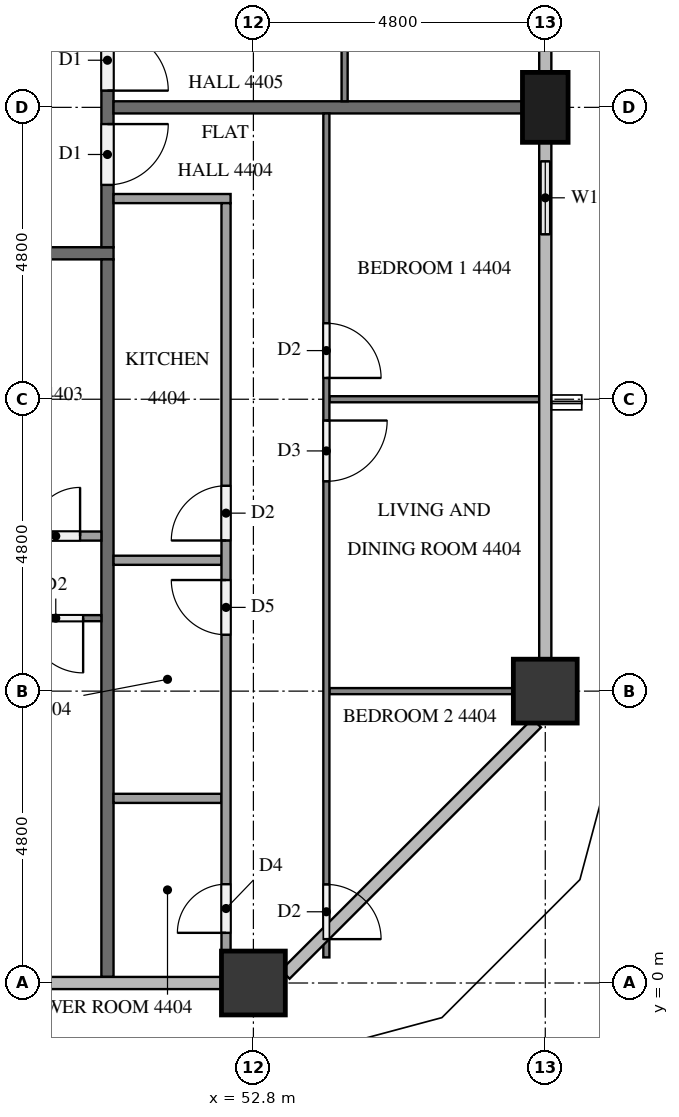
"""IFC4 building model, lengths in metres.
Left out: names, types, materials, properties, quantities, classifications, styles, units other than length and angle.
Written with IfcOpenShell. Run it as: python <this file> out.ifc"""

import sys

from ifc_helpers import new_model, si_unit, direction, frame, frame_2d, origin, origin_2d, place, context, subcontext, project, spatial, rectangle, extrude, element, fill, save


model = new_model("IFC4")
c1 = context("Model", 3, precision=1e-05, world=origin(), true_north=direction((0.0, 1.0)))
c2 = subcontext(c1, "Body", "Model", "MODEL_VIEW")
j1 = project(units=[si_unit("LENGTHUNIT", "METRE"), si_unit("PLANEANGLEUNIT", "RADIAN")], contexts=[c1])
p1 = place(None, origin())
s1 = spatial("IfcSite", under=j1, at=p1, CompositionType="ELEMENT")
p2 = place(p1, origin())
s2 = spatial("IfcBuilding", under=s1, at=p2, CompositionType="ELEMENT")
p3 = place(p2, frame((0.0, 0.0, 170.0)))
s3 = spatial("IfcBuildingStorey", under=s2, at=p3, CompositionType="ELEMENT", Elevation=170.0)
for number, where, z_axis, x_axis in (
    (1, (52.8, 0.0, 0.0), (0.0, 0.0, 1.0), (1.0, 0.0, 0.0)),
    (2, (57.6, 4.8, 0.0), (0.0, 0.0, 1.0), (1.0, 0.0, 0.0)),
):
    element("IfcColumn", number, at=place(p3, frame(where, z_axis=z_axis, x_axis=x_axis)), inside=s3, PredefinedType="COLUMN", context=c2, shape_type="SweptSolid", body=[
        extrude(rectangle(XDim=1.05, YDim=1.05, at=origin_2d()), origin(), (0.0, 0.0, 1.0), 3.1),
    ])
p4 = place(p3, frame((57.6, 14.4, 0.0), z_axis=(0.0, 0.0, 1.0), x_axis=(0.0, 1.0, 0.0)))
e3 = element("IfcColumn", 3, at=p4, inside=s3, PredefinedType="COLUMN", context=c2, shape_type="SweptSolid", body=[
    extrude(rectangle(XDim=1.15, YDim=0.75, at=origin_2d()), origin(), (0.0, 0.0, 1.0), 3.1),
])
p5 = place(p3, frame((57.6, 12.0, 0.0), z_axis=(0.0, 0.0, 1.0), x_axis=(0.0, 1.0, 0.0)))
e4 = element("IfcWall", 4, at=p5, inside=s3, PredefinedType="SOLIDWALL", context=c2, shape_type="SweptSolid", body=[
    extrude(rectangle(XDim=1.825, YDim=0.15, at=frame_2d((0.913, 0.0))), origin(), (0.0, 0.0, 1.0), 3.1),
])
p6 = place(p5, frame((0.312, 0.0, 0.9)))
e5 = element("IfcOpeningElement", 5, at=p6, cuts=e4, PredefinedType="OPENING", context=c2, shape_type="SweptSolid", body=[
    extrude(rectangle(XDim=1.2, YDim=1.4, at=frame_2d((0.6, 0.7))), frame((0.0, 0.085, 0.0), z_axis=(0.0, -1.0, 0.0), x_axis=(1.0, 0.0, 0.0)), (0.0, 0.0, 1.0), 0.17),
])
p7 = place(p3, frame((50.5, 12.0, 0.0), z_axis=(0.0, 0.0, 1.0), x_axis=(-1.0, 0.0, 0.0)))
e6 = element("IfcWall", 6, at=p7, inside=s3, PredefinedType="PARTITIONING", context=c2, shape_type="SweptSolid", body=[
    extrude(rectangle(XDim=38.6, YDim=0.2, at=frame_2d((19.3, 0.0))), origin(), (0.0, 0.0, 1.0), 3.1),
])
p8 = place(p7, frame((37.225, 0.0, 0.0)))
e7 = element("IfcOpeningElement", 7, at=p8, cuts=e6, PredefinedType="OPENING", context=c2, shape_type="SweptSolid", body=[
    extrude(rectangle(XDim=1.0, YDim=2.1, at=frame_2d((0.5, 1.05))), frame((0.0, 0.11, 0.0), z_axis=(0.0, -1.0, 0.0), x_axis=(1.0, 0.0, 0.0)), (0.0, 0.0, 1.0), 0.22),
])
p9 = place(p7, frame((22.825, 0.0, 0.0)))
e8 = element("IfcOpeningElement", 8, at=p9, cuts=e6, PredefinedType="OPENING", context=c2, shape_type="SweptSolid", body=[
    extrude(rectangle(XDim=1.0, YDim=2.1, at=frame_2d((0.5, 1.05))), frame((0.0, 0.11, 0.0), z_axis=(0.0, -1.0, 0.0), x_axis=(1.0, 0.0, 0.0)), (0.0, 0.0, 1.0), 0.22),
])
p10 = place(p7, frame((8.425, 0.0, 0.0)))
e9 = element("IfcOpeningElement", 9, at=p10, cuts=e6, PredefinedType="OPENING", context=c2, shape_type="SweptSolid", body=[
    extrude(rectangle(XDim=1.0, YDim=2.1, at=frame_2d((0.5, 1.05))), frame((0.0, 0.11, 0.0), z_axis=(0.0, -1.0, 0.0), x_axis=(1.0, 0.0, 0.0)), (0.0, 0.0, 1.0), 0.22),
])
p11 = place(p3, frame((50.4, 40.7, 0.0), z_axis=(0.0, 0.0, 1.0), x_axis=(0.0, -1.0, 0.0)))
e10 = element("IfcWall", 10, at=p11, inside=s3, PredefinedType="PARTITIONING", context=c2, shape_type="SweptSolid", body=[
    extrude(rectangle(XDim=28.6, YDim=0.2, at=frame_2d((14.3, 0.0))), origin(), (0.0, 0.0, 1.0), 3.1),
])
p12 = place(p11, frame((26.575, 0.0, 0.0)))
e11 = element("IfcOpeningElement", 11, at=p12, cuts=e10, PredefinedType="OPENING", context=c2, shape_type="SweptSolid", body=[
    extrude(rectangle(XDim=1.0, YDim=2.1, at=frame_2d((0.5, 1.05))), frame((0.0, 0.11, 0.0), z_axis=(0.0, -1.0, 0.0), x_axis=(1.0, 0.0, 0.0)), (0.0, 0.0, 1.0), 0.22),
])
p13 = place(p11, frame((25.025, 0.0, 0.0)))
e12 = element("IfcOpeningElement", 12, at=p13, cuts=e10, PredefinedType="OPENING", context=c2, shape_type="SweptSolid", body=[
    extrude(rectangle(XDim=1.0, YDim=2.1, at=frame_2d((0.5, 1.05))), frame((0.0, 0.11, 0.0), z_axis=(0.0, -1.0, 0.0), x_axis=(1.0, 0.0, 0.0)), (0.0, 0.0, 1.0), 0.22),
])
p14 = place(p11, frame((4.975, 0.0, 0.0)))
e13 = element("IfcOpeningElement", 13, at=p14, cuts=e10, PredefinedType="OPENING", context=c2, shape_type="SweptSolid", body=[
    extrude(rectangle(XDim=1.0, YDim=2.1, at=frame_2d((0.5, 1.05))), frame((0.0, 0.11, 0.0), z_axis=(0.0, -1.0, 0.0), x_axis=(1.0, 0.0, 0.0)), (0.0, 0.0, 1.0), 0.22),
])
p15 = place(p11, frame((3.425, 0.0, 0.0)))
e14 = element("IfcOpeningElement", 14, at=p15, cuts=e10, PredefinedType="OPENING", context=c2, shape_type="SweptSolid", body=[
    extrude(rectangle(XDim=1.0, YDim=2.1, at=frame_2d((0.5, 1.05))), frame((0.0, 0.11, 0.0), z_axis=(0.0, -1.0, 0.0), x_axis=(1.0, 0.0, 0.0)), (0.0, 0.0, 1.0), 0.22),
])
p16 = place(p3, frame((50.4, 11.9, 0.0), z_axis=(0.0, 0.0, 1.0), x_axis=(0.0, -1.0, 0.0)))
e15 = element("IfcWall", 15, at=p16, inside=s3, PredefinedType="PARTITIONING", context=c2, shape_type="SweptSolid", body=[
    extrude(rectangle(XDim=11.8, YDim=0.2, at=frame_2d((5.9, 0.0))), origin(), (0.0, 0.0, 1.0), 3.1),
])
p17 = place(p3, frame((50.5, 14.4, 0.0), z_axis=(0.0, 0.0, 1.0), x_axis=(1.0, 0.0, 0.0)))
e16 = element("IfcWall", 16, at=p17, inside=s3, PredefinedType="PARTITIONING", context=c2, shape_type="SweptSolid", body=[
    extrude(rectangle(XDim=6.725, YDim=0.2, at=frame_2d((3.363, 0.0))), origin(), (0.0, 0.0, 1.0), 3.1),
])
p18 = place(p3, frame((50.3, 6.0, 0.0), z_axis=(0.0, 0.0, 1.0), x_axis=(-1.0, 0.0, 0.0)))
e17 = element("IfcWall", 17, at=p18, inside=s3, PredefinedType="PARTITIONING", context=c2, shape_type="SweptSolid", body=[
    extrude(rectangle(XDim=9.4, YDim=0.1, at=frame_2d((4.7, 0.0))), origin(), (0.0, 0.0, 1.0), 3.1),
])
p19 = place(p18, frame((8.1, 0.0, 0.0)))
e18 = element("IfcOpeningElement", 18, at=p19, cuts=e17, PredefinedType="OPENING", context=c2, shape_type="SweptSolid", body=[
    extrude(rectangle(XDim=1.0, YDim=2.1, at=frame_2d((0.5, 1.05))), frame((0.0, 0.06, 0.0), z_axis=(0.0, -1.0, 0.0), x_axis=(1.0, 0.0, 0.0)), (0.0, 0.0, 1.0), 0.12),
])
p20 = place(p18, frame((0.3, 0.0, 0.0)))
e19 = element("IfcOpeningElement", 19, at=p20, cuts=e17, PredefinedType="OPENING", context=c2, shape_type="SweptSolid", body=[
    extrude(rectangle(XDim=0.9, YDim=2.1, at=frame_2d((0.45, 1.05))), frame((0.0, 0.06, 0.0), z_axis=(0.0, -1.0, 0.0), x_axis=(1.0, 0.0, 0.0)), (0.0, 0.0, 1.0), 0.12),
])
p21 = place(p3, frame((42.375, 7.35, 0.0), z_axis=(0.0, 0.0, 1.0), x_axis=(1.0, 0.0, 0.0)))
e20 = element("IfcWall", 20, at=p21, inside=s3, PredefinedType="PARTITIONING", context=c2, shape_type="SweptSolid", body=[
    extrude(rectangle(XDim=7.925, YDim=0.15, at=frame_2d((3.962, 0.0))), origin(), (0.0, 0.0, 1.0), 3.1),
])
p22 = place(p21, frame((0.3, 0.0, 0.0)))
e21 = element("IfcOpeningElement", 21, at=p22, cuts=e20, PredefinedType="OPENING", context=c2, shape_type="SweptSolid", body=[
    extrude(rectangle(XDim=0.9, YDim=2.1, at=frame_2d((0.45, 1.05))), frame((0.0, 0.085, 0.0), z_axis=(0.0, -1.0, 0.0), x_axis=(1.0, 0.0, 0.0)), (0.0, 0.0, 1.0), 0.17),
])
p23 = place(p21, frame((6.775, 0.0, 0.0)))
e22 = element("IfcOpeningElement", 22, at=p23, cuts=e20, PredefinedType="OPENING", context=c2, shape_type="SweptSolid", body=[
    extrude(rectangle(XDim=0.8, YDim=2.1, at=frame_2d((0.4, 1.05))), frame((0.0, 0.085, 0.0), z_axis=(0.0, -1.0, 0.0), x_axis=(1.0, 0.0, 0.0)), (0.0, 0.0, 1.0), 0.17),
])
p24 = place(p3, frame((54.05, 9.6, 0.0), z_axis=(0.0, 0.0, 1.0), x_axis=(1.0, 0.0, 0.0)))
e23 = element("IfcWall", 23, at=p24, inside=s3, PredefinedType="PARTITIONING", context=c2, shape_type="SweptSolid", body=[
    extrude(rectangle(XDim=3.45, YDim=0.1, at=frame_2d((1.725, 0.0))), origin(), (0.0, 0.0, 1.0), 3.1),
])
p25 = place(p3, frame((54.05, 4.8, 0.0), z_axis=(0.0, 0.0, 1.0), x_axis=(1.0, 0.0, 0.0)))
e24 = element("IfcWall", 24, at=p25, inside=s3, PredefinedType="PARTITIONING", context=c2, shape_type="SweptSolid", body=[
    extrude(rectangle(XDim=3.025, YDim=0.1, at=frame_2d((1.512, 0.0))), origin(), (0.0, 0.0, 1.0), 3.1),
])
p26 = place(p3, frame((54.0, 14.3, 0.0), z_axis=(0.0, 0.0, 1.0), x_axis=(0.0, -1.0, 0.0)))
e25 = element("IfcWall", 25, at=p26, inside=s3, PredefinedType="PARTITIONING", context=c2, shape_type="SweptSolid", body=[
    extrude(rectangle(XDim=13.879, YDim=0.1, at=frame_2d((6.939, 0.0))), origin(), (0.0, 0.0, 1.0), 3.1),
])
p27 = place(p26, frame((3.45, 0.0, 0.0)))
e26 = element("IfcOpeningElement", 26, at=p27, cuts=e25, PredefinedType="OPENING", context=c2, shape_type="SweptSolid", body=[
    extrude(rectangle(XDim=0.9, YDim=2.1, at=frame_2d((0.45, 1.05))), frame((0.0, 0.06, 0.0), z_axis=(0.0, -1.0, 0.0), x_axis=(1.0, 0.0, 0.0)), (0.0, 0.0, 1.0), 0.12),
])
p28 = place(p26, frame((5.05, 0.0, 0.0)))
e27 = element("IfcOpeningElement", 27, at=p28, cuts=e25, PredefinedType="OPENING", context=c2, shape_type="SweptSolid", body=[
    extrude(rectangle(XDim=1.0, YDim=2.1, at=frame_2d((0.5, 1.05))), frame((0.0, 0.06, 0.0), z_axis=(0.0, -1.0, 0.0), x_axis=(1.0, 0.0, 0.0)), (0.0, 0.0, 1.0), 0.12),
])
p29 = place(p26, frame((12.678, 0.0, 0.0)))
e28 = element("IfcOpeningElement", 28, at=p29, cuts=e25, PredefinedType="OPENING", context=c2, shape_type="SweptSolid", body=[
    extrude(rectangle(XDim=0.9, YDim=2.1, at=frame_2d((0.45, 1.05))), frame((0.0, 0.06, 0.0), z_axis=(0.0, -1.0, 0.0), x_axis=(1.0, 0.0, 0.0)), (0.0, 0.0, 1.0), 0.12),
])
for number, where, z_axis, x_axis in (
    (29, (50.5, 6.952, 0.0), (0.0, 0.0, 1.0), (1.0, 0.0, 0.0)),
    (30, (50.5, 3.037, 0.0), (0.0, 0.0, 1.0), (1.0, 0.0, 0.0)),
):
    element("IfcWall", number, at=place(p3, frame(where, z_axis=z_axis, x_axis=x_axis)), inside=s3, PredefinedType="PARTITIONING", context=c2, shape_type="SweptSolid", body=[
        extrude(rectangle(XDim=1.775, YDim=0.15, at=frame_2d((0.887, 0.0))), origin(), (0.0, 0.0, 1.0), 3.1),
    ])
p30 = place(p3, frame((50.5, 12.9, 0.0), z_axis=(0.0, 0.0, 1.0), x_axis=(1.0, 0.0, 0.0)))
e31 = element("IfcWall", 31, at=p30, inside=s3, PredefinedType="PARTITIONING", context=c2, shape_type="SweptSolid", body=[
    extrude(rectangle(XDim=1.925, YDim=0.15, at=frame_2d((0.962, 0.0))), origin(), (0.0, 0.0, 1.0), 3.1),
])
p31 = place(p3, frame((52.35, 0.525, 0.0), z_axis=(0.0, 0.0, 1.0), x_axis=(0.0, 1.0, 0.0)))
e32 = element("IfcWall", 32, at=p31, inside=s3, PredefinedType="PARTITIONING", context=c2, shape_type="SweptSolid", body=[
    extrude(rectangle(XDim=12.3, YDim=0.15, at=frame_2d((6.15, 0.0))), origin(), (0.0, 0.0, 1.0), 3.1),
])
p32 = place(p31, frame((6.752, 0.0, 0.0)))
e33 = element("IfcOpeningElement", 33, at=p32, cuts=e32, PredefinedType="OPENING", context=c2, shape_type="SweptSolid", body=[
    extrude(rectangle(XDim=0.9, YDim=2.1, at=frame_2d((0.45, 1.05))), frame((0.0, 0.085, 0.0), z_axis=(0.0, -1.0, 0.0), x_axis=(1.0, 0.0, 0.0)), (0.0, 0.0, 1.0), 0.17),
])
p33 = place(p31, frame((5.202, 0.0, 0.0)))
e34 = element("IfcOpeningElement", 34, at=p33, cuts=e32, PredefinedType="OPENING", context=c2, shape_type="SweptSolid", body=[
    extrude(rectangle(XDim=0.9, YDim=2.1, at=frame_2d((0.45, 1.05))), frame((0.0, 0.085, 0.0), z_axis=(0.0, -1.0, 0.0), x_axis=(1.0, 0.0, 0.0)), (0.0, 0.0, 1.0), 0.17),
])
p34 = place(p31, frame((0.3, 0.0, 0.0)))
e35 = element("IfcOpeningElement", 35, at=p34, cuts=e32, PredefinedType="OPENING", context=c2, shape_type="SweptSolid", body=[
    extrude(rectangle(XDim=0.8, YDim=2.1, at=frame_2d((0.4, 1.05))), frame((0.0, 0.085, 0.0), z_axis=(0.0, -1.0, 0.0), x_axis=(1.0, 0.0, 0.0)), (0.0, 0.0, 1.0), 0.17),
])
p35 = place(p3, frame((54.3, 28.7, 0.0), z_axis=(0.0, 0.0, 1.0), x_axis=(0.0, -1.0, 0.0)))
e36 = element("IfcWall", 36, at=p35, inside=s3, PredefinedType="PARTITIONING", context=c2, shape_type="SweptSolid", body=[
    extrude(rectangle(XDim=14.2, YDim=0.1, at=frame_2d((7.1, 0.0))), origin(), (0.0, 0.0, 1.0), 3.1),
])
p36 = place(p35, frame((9.85, 0.0, 0.0)))
e37 = element("IfcOpeningElement", 37, at=p36, cuts=e36, PredefinedType="OPENING", context=c2, shape_type="SweptSolid", body=[
    extrude(rectangle(XDim=1.0, YDim=2.1, at=frame_2d((0.5, 1.05))), frame((0.0, 0.06, 0.0), z_axis=(0.0, -1.0, 0.0), x_axis=(1.0, 0.0, 0.0)), (0.0, 0.0, 1.0), 0.12),
])
p37 = place(p35, frame((8.25, 0.0, 0.0)))
e38 = element("IfcOpeningElement", 38, at=p37, cuts=e36, PredefinedType="OPENING", context=c2, shape_type="SweptSolid", body=[
    extrude(rectangle(XDim=0.9, YDim=2.1, at=frame_2d((0.45, 1.05))), frame((0.0, 0.06, 0.0), z_axis=(0.0, -1.0, 0.0), x_axis=(1.0, 0.0, 0.0)), (0.0, 0.0, 1.0), 0.12),
])
p38 = place(p35, frame((0.3, 0.0, 0.0)))
e39 = element("IfcOpeningElement", 39, at=p38, cuts=e36, PredefinedType="OPENING", context=c2, shape_type="SweptSolid", body=[
    extrude(rectangle(XDim=0.9, YDim=2.1, at=frame_2d((0.45, 1.05))), frame((0.0, 0.06, 0.0), z_axis=(0.0, -1.0, 0.0), x_axis=(1.0, 0.0, 0.0)), (0.0, 0.0, 1.0), 0.12),
])
p39 = place(p6, origin())
e40 = element("IfcWindow", 40, at=p39, inside=s3, PartitioningType="SINGLE_PANEL", PredefinedType="WINDOW", context=c2, shape_type="SweptSolid", body=[
    extrude(rectangle(XDim=1.2, YDim=1.4, at=frame_2d((0.6, 0.7))), frame((0.0, 0.03, 0.0), z_axis=(0.0, -1.0, 0.0), x_axis=(1.0, 0.0, 0.0)), (0.0, 0.0, 1.0), 0.06),
])
fill(e5, e40)
p40 = place(p12, origin())
e41 = element("IfcDoor", 41, at=p40, inside=s3, OperationType="SINGLE_SWING_LEFT", PredefinedType="DOOR", context=c2, shape_type="SweptSolid", body=[
    extrude(rectangle(XDim=1.0, YDim=2.1, at=frame_2d((0.5, 1.05))), frame((0.0, 0.025, 0.0), z_axis=(0.0, -1.0, 0.0), x_axis=(1.0, 0.0, 0.0)), (0.0, 0.0, 1.0), 0.05),
])
fill(e11, e41)
p41 = place(p13, origin())
e42 = element("IfcDoor", 42, at=p41, inside=s3, OperationType="SINGLE_SWING_RIGHT", PredefinedType="DOOR", context=c2, shape_type="SweptSolid", body=[
    extrude(rectangle(XDim=1.0, YDim=2.1, at=frame_2d((0.5, 1.05))), frame((0.0, 0.025, 0.0), z_axis=(0.0, -1.0, 0.0), x_axis=(1.0, 0.0, 0.0)), (0.0, 0.0, 1.0), 0.05),
])
fill(e12, e42)
p42 = place(p20, origin())
e43 = element("IfcDoor", 43, at=p42, inside=s3, OperationType="SINGLE_SWING_LEFT", PredefinedType="DOOR", context=c2, shape_type="SweptSolid", body=[
    extrude(rectangle(XDim=0.9, YDim=2.1, at=frame_2d((0.45, 1.05))), frame((0.0, 0.025, 0.0), z_axis=(0.0, -1.0, 0.0), x_axis=(1.0, 0.0, 0.0)), (0.0, 0.0, 1.0), 0.05),
])
fill(e19, e43)
p43 = place(p23, origin())
e44 = element("IfcDoor", 44, at=p43, inside=s3, OperationType="SINGLE_SWING_RIGHT", PredefinedType="DOOR", context=c2, shape_type="SweptSolid", body=[
    extrude(rectangle(XDim=0.8, YDim=2.1, at=frame_2d((0.4, 1.05))), frame((0.0, 0.025, 0.0), z_axis=(0.0, -1.0, 0.0), x_axis=(1.0, 0.0, 0.0)), (0.0, 0.0, 1.0), 0.05),
])
fill(e22, e44)
p44 = place(p27, origin())
e45 = element("IfcDoor", 45, at=p44, inside=s3, OperationType="SINGLE_SWING_RIGHT", PredefinedType="DOOR", context=c2, shape_type="SweptSolid", body=[
    extrude(rectangle(XDim=0.9, YDim=2.1, at=frame_2d((0.45, 1.05))), frame((0.0, 0.025, 0.0), z_axis=(0.0, -1.0, 0.0), x_axis=(1.0, 0.0, 0.0)), (0.0, 0.0, 1.0), 0.05),
])
fill(e26, e45)
p45 = place(p28, origin())
e46 = element("IfcDoor", 46, at=p45, inside=s3, OperationType="SINGLE_SWING_LEFT", PredefinedType="DOOR", context=c2, shape_type="SweptSolid", body=[
    extrude(rectangle(XDim=1.0, YDim=2.1, at=frame_2d((0.5, 1.05))), frame((0.0, 0.025, 0.0), z_axis=(0.0, -1.0, 0.0), x_axis=(1.0, 0.0, 0.0)), (0.0, 0.0, 1.0), 0.05),
])
fill(e27, e46)
p46 = place(p29, origin())
e47 = element("IfcDoor", 47, at=p46, inside=s3, OperationType="SINGLE_SWING_RIGHT", PredefinedType="DOOR", context=c2, shape_type="SweptSolid", body=[
    extrude(rectangle(XDim=0.9, YDim=2.1, at=frame_2d((0.45, 1.05))), frame((0.0, 0.025, 0.0), z_axis=(0.0, -1.0, 0.0), x_axis=(1.0, 0.0, 0.0)), (0.0, 0.0, 1.0), 0.05),
])
fill(e28, e47)
p47 = place(p32, origin())
e48 = element("IfcDoor", 48, at=p47, inside=s3, OperationType="SINGLE_SWING_LEFT", PredefinedType="DOOR", context=c2, shape_type="SweptSolid", body=[
    extrude(rectangle(XDim=0.9, YDim=2.1, at=frame_2d((0.45, 1.05))), frame((0.0, 0.025, 0.0), z_axis=(0.0, -1.0, 0.0), x_axis=(1.0, 0.0, 0.0)), (0.0, 0.0, 1.0), 0.05),
])
fill(e33, e48)
p48 = place(p33, origin())
e49 = element("IfcDoor", 49, at=p48, inside=s3, OperationType="SINGLE_SWING_RIGHT", PredefinedType="DOOR", context=c2, shape_type="SweptSolid", body=[
    extrude(rectangle(XDim=0.9, YDim=2.1, at=frame_2d((0.45, 1.05))), frame((0.0, 0.025, 0.0), z_axis=(0.0, -1.0, 0.0), x_axis=(1.0, 0.0, 0.0)), (0.0, 0.0, 1.0), 0.05),
])
fill(e34, e49)
p49 = place(p34, origin())
e50 = element("IfcDoor", 50, at=p49, inside=s3, OperationType="SINGLE_SWING_LEFT", PredefinedType="DOOR", context=c2, shape_type="SweptSolid", body=[
    extrude(rectangle(XDim=0.8, YDim=2.1, at=frame_2d((0.4, 1.05))), frame((0.0, 0.025, 0.0), z_axis=(0.0, -1.0, 0.0), x_axis=(1.0, 0.0, 0.0)), (0.0, 0.0, 1.0), 0.05),
])
fill(e35, e50)
save(model, sys.argv[1])
